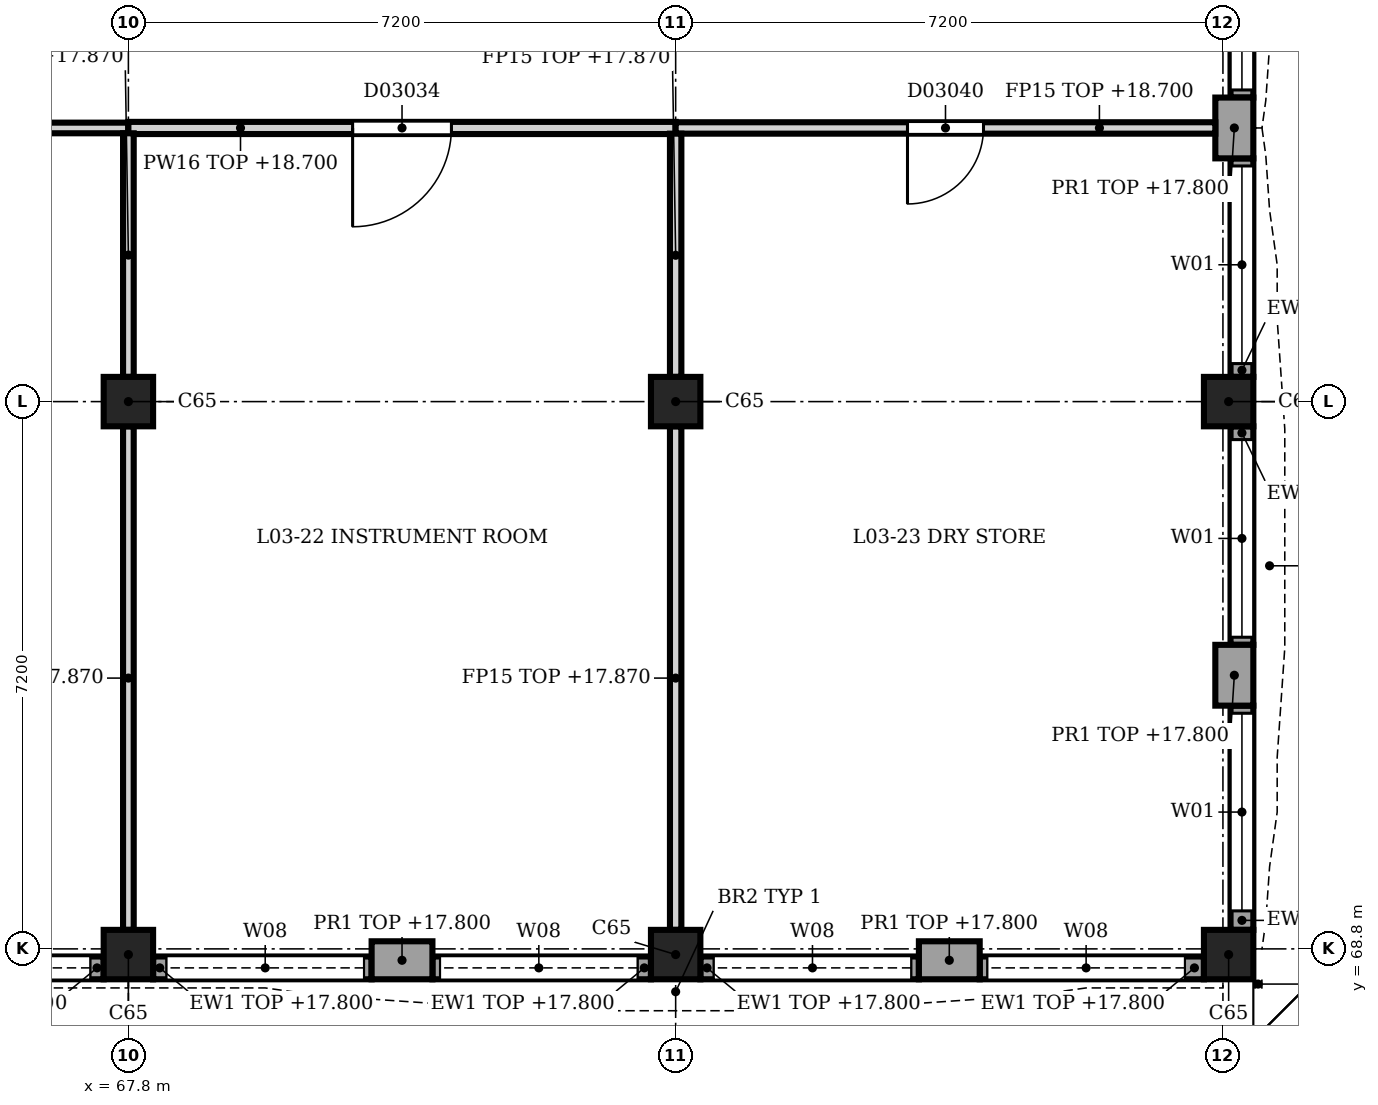
"""IFC4 building model, lengths in metres.
Left out: names, types, materials, properties, quantities, classifications, styles, units other than length and angle.
Written with IfcOpenShell. Run it as: python <this file> out.ifc"""

import sys

from ifc_helpers import new_model, si_unit, direction, frame, frame_2d, origin, origin_2d, place, context, subcontext, project, spatial, rectangle, extrude, element, fill, save


model = new_model("IFC4")
c1 = context("Model", 3, precision=1e-05, world=origin(), true_north=direction((0.0, 1.0)))
c2 = subcontext(c1, "Body", "Model", "MODEL_VIEW")
j1 = project(units=[si_unit("LENGTHUNIT", "METRE"), si_unit("PLANEANGLEUNIT", "RADIAN")], contexts=[c1])
p1 = place(None, origin())
s1 = spatial("IfcSite", under=j1, at=p1, CompositionType="ELEMENT")
p2 = place(p1, origin())
s2 = spatial("IfcBuilding", under=s1, at=p2, CompositionType="ELEMENT")
p3 = place(p2, frame((0.0, 0.0, 14.4)))
s3 = spatial("IfcBuildingStorey", under=s2, at=p3, CompositionType="ELEMENT", Elevation=14.4)
for number, where, z_axis, x_axis in (
    (1, (67.8, 68.725, 0.0), (0.0, 0.0, 1.0), (1.0, 0.0, 0.0)),
    (2, (67.8, 76.0, 0.0), (0.0, 0.0, 1.0), (1.0, 0.0, 0.0)),
    (3, (75.0, 68.725, 0.0), (0.0, 0.0, 1.0), (1.0, 0.0, 0.0)),
    (4, (75.0, 76.0, 0.0), (0.0, 0.0, 1.0), (1.0, 0.0, 0.0)),
    (5, (82.275, 68.725, 0.0), (0.0, 0.0, 1.0), (1.0, 0.0, 0.0)),
    (6, (82.275, 76.0, 0.0), (0.0, 0.0, 1.0), (1.0, 0.0, 0.0)),
):
    element("IfcColumn", number, at=place(p3, frame(where, z_axis=z_axis, x_axis=x_axis)), inside=s3, PredefinedType="COLUMN", context=c2, shape_type="SweptSolid", body=[
        extrude(rectangle(XDim=0.65, YDim=0.65, at=origin_2d()), origin(), (0.0, 0.0, 1.0), 4.5),
    ])
for number, where, z_axis, x_axis in (
    (7, (82.35, 80.0, 0.0), (0.0, 0.0, 1.0), (0.0, -1.0, 0.0)),
    (8, (82.35, 72.8, 0.0), (0.0, 0.0, 1.0), (0.0, -1.0, 0.0)),
):
    element("IfcWall", number, at=place(p3, frame(where, z_axis=z_axis, x_axis=x_axis)), inside=s3, PredefinedType="SOLIDWALL", context=c2, shape_type="SweptSolid", body=[
        extrude(rectangle(XDim=0.8, YDim=0.5, at=frame_2d((0.4, 0.0))), origin(), (0.0, 0.0, 1.0), 3.4),
    ])
p4 = place(p3, frame((82.45, 82.875, 0.0), z_axis=(0.0, 0.0, 1.0), x_axis=(0.0, -1.0, 0.0)))
e9 = element("IfcWall", 9, at=p4, inside=s3, PredefinedType="SOLIDWALL", context=c2, shape_type="SweptSolid", body=[
    extrude(rectangle(XDim=2.875, YDim=0.3, at=frame_2d((1.438, 0.0))), origin(), (0.0, 0.0, 1.0), 3.4),
])
p5 = place(p4, frame((0.175, 0.0, 0.9)))
e10 = element("IfcOpeningElement", 10, at=p5, cuts=e9, PredefinedType="OPENING", context=c2, shape_type="SweptSolid", body=[
    extrude(rectangle(XDim=2.6, YDim=2.4, at=frame_2d((1.3, 1.2))), frame((0.0, 0.16, 0.0), z_axis=(0.0, -1.0, 0.0), x_axis=(1.0, 0.0, 0.0)), (0.0, 0.0, 1.0), 0.32),
])
p6 = place(p3, frame((82.45, 79.2, 0.0), z_axis=(0.0, 0.0, 1.0), x_axis=(0.0, -1.0, 0.0)))
e11 = element("IfcWall", 11, at=p6, inside=s3, PredefinedType="SOLIDWALL", context=c2, shape_type="SweptSolid", body=[
    extrude(rectangle(XDim=2.875, YDim=0.3, at=frame_2d((1.438, 0.0))), origin(), (0.0, 0.0, 1.0), 3.4),
])
p7 = place(p6, frame((0.1, 0.0, 0.9)))
e12 = element("IfcOpeningElement", 12, at=p7, cuts=e11, PredefinedType="OPENING", context=c2, shape_type="SweptSolid", body=[
    extrude(rectangle(XDim=2.6, YDim=2.4, at=frame_2d((1.3, 1.2))), frame((0.0, 0.16, 0.0), z_axis=(0.0, -1.0, 0.0), x_axis=(1.0, 0.0, 0.0)), (0.0, 0.0, 1.0), 0.32),
])
p8 = place(p3, frame((82.45, 75.675, 0.0), z_axis=(0.0, 0.0, 1.0), x_axis=(0.0, -1.0, 0.0)))
e13 = element("IfcWall", 13, at=p8, inside=s3, PredefinedType="SOLIDWALL", context=c2, shape_type="SweptSolid", body=[
    extrude(rectangle(XDim=2.875, YDim=0.3, at=frame_2d((1.438, 0.0))), origin(), (0.0, 0.0, 1.0), 3.4),
])
p9 = place(p8, frame((0.175, 0.0, 0.9)))
e14 = element("IfcOpeningElement", 14, at=p9, cuts=e13, PredefinedType="OPENING", context=c2, shape_type="SweptSolid", body=[
    extrude(rectangle(XDim=2.6, YDim=2.4, at=frame_2d((1.3, 1.2))), frame((0.0, 0.16, 0.0), z_axis=(0.0, -1.0, 0.0), x_axis=(1.0, 0.0, 0.0)), (0.0, 0.0, 1.0), 0.32),
])
p10 = place(p3, frame((82.45, 72.0, 0.0), z_axis=(0.0, 0.0, 1.0), x_axis=(0.0, -1.0, 0.0)))
e15 = element("IfcWall", 15, at=p10, inside=s3, PredefinedType="SOLIDWALL", context=c2, shape_type="SweptSolid", body=[
    extrude(rectangle(XDim=2.95, YDim=0.3, at=frame_2d((1.475, 0.0))), origin(), (0.0, 0.0, 1.0), 3.4),
])
p11 = place(p10, frame((0.1, 0.0, 0.9)))
e16 = element("IfcOpeningElement", 16, at=p11, cuts=e15, PredefinedType="OPENING", context=c2, shape_type="SweptSolid", body=[
    extrude(rectangle(XDim=2.6, YDim=2.4, at=frame_2d((1.3, 1.2))), frame((0.0, 0.16, 0.0), z_axis=(0.0, -1.0, 0.0), x_axis=(1.0, 0.0, 0.0)), (0.0, 0.0, 1.0), 0.32),
])
for number, where, z_axis, x_axis in (
    (17, (79.0, 68.65, 0.0), (0.0, 0.0, 1.0), (-1.0, 0.0, 0.0)),
    (18, (71.8, 68.65, 0.0), (0.0, 0.0, 1.0), (-1.0, 0.0, 0.0)),
):
    element("IfcWall", number, at=place(p3, frame(where, z_axis=z_axis, x_axis=x_axis)), inside=s3, PredefinedType="SOLIDWALL", context=c2, shape_type="SweptSolid", body=[
        extrude(rectangle(XDim=0.8, YDim=0.5, at=frame_2d((0.4, 0.0))), origin(), (0.0, 0.0, 1.0), 3.4),
    ])
p12 = place(p3, frame((81.95, 68.55, 0.0), z_axis=(0.0, 0.0, 1.0), x_axis=(-1.0, 0.0, 0.0)))
e19 = element("IfcWall", 19, at=p12, inside=s3, PredefinedType="SOLIDWALL", context=c2, shape_type="SweptSolid", body=[
    extrude(rectangle(XDim=2.95, YDim=0.3, at=frame_2d((1.475, 0.0))), origin(), (0.0, 0.0, 1.0), 3.4),
])
p13 = place(p12, frame((0.25, 0.0, 1.2)))
e20 = element("IfcOpeningElement", 20, at=p13, cuts=e19, PredefinedType="OPENING", context=c2, shape_type="SweptSolid", body=[
    extrude(rectangle(XDim=2.6, YDim=2.1, at=frame_2d((1.3, 1.05))), frame((0.0, 0.16, 0.0), z_axis=(0.0, -1.0, 0.0), x_axis=(1.0, 0.0, 0.0)), (0.0, 0.0, 1.0), 0.32),
])
p14 = place(p3, frame((78.2, 68.55, 0.0), z_axis=(0.0, 0.0, 1.0), x_axis=(-1.0, 0.0, 0.0)))
e21 = element("IfcWall", 21, at=p14, inside=s3, PredefinedType="SOLIDWALL", context=c2, shape_type="SweptSolid", body=[
    extrude(rectangle(XDim=2.875, YDim=0.3, at=frame_2d((1.438, 0.0))), origin(), (0.0, 0.0, 1.0), 3.4),
])
p15 = place(p14, frame((0.1, 0.0, 1.2)))
e22 = element("IfcOpeningElement", 22, at=p15, cuts=e21, PredefinedType="OPENING", context=c2, shape_type="SweptSolid", body=[
    extrude(rectangle(XDim=2.6, YDim=2.1, at=frame_2d((1.3, 1.05))), frame((0.0, 0.16, 0.0), z_axis=(0.0, -1.0, 0.0), x_axis=(1.0, 0.0, 0.0)), (0.0, 0.0, 1.0), 0.32),
])
p16 = place(p3, frame((74.675, 68.55, 0.0), z_axis=(0.0, 0.0, 1.0), x_axis=(-1.0, 0.0, 0.0)))
e23 = element("IfcWall", 23, at=p16, inside=s3, PredefinedType="SOLIDWALL", context=c2, shape_type="SweptSolid", body=[
    extrude(rectangle(XDim=2.875, YDim=0.3, at=frame_2d((1.438, 0.0))), origin(), (0.0, 0.0, 1.0), 3.4),
])
p17 = place(p16, frame((0.175, 0.0, 1.2)))
e24 = element("IfcOpeningElement", 24, at=p17, cuts=e23, PredefinedType="OPENING", context=c2, shape_type="SweptSolid", body=[
    extrude(rectangle(XDim=2.6, YDim=2.1, at=frame_2d((1.3, 1.05))), frame((0.0, 0.16, 0.0), z_axis=(0.0, -1.0, 0.0), x_axis=(1.0, 0.0, 0.0)), (0.0, 0.0, 1.0), 0.32),
])
p18 = place(p3, frame((71.0, 68.55, 0.0), z_axis=(0.0, 0.0, 1.0), x_axis=(-1.0, 0.0, 0.0)))
e25 = element("IfcWall", 25, at=p18, inside=s3, PredefinedType="SOLIDWALL", context=c2, shape_type="SweptSolid", body=[
    extrude(rectangle(XDim=2.875, YDim=0.3, at=frame_2d((1.438, 0.0))), origin(), (0.0, 0.0, 1.0), 3.4),
])
p19 = place(p18, frame((0.1, 0.0, 1.2)))
e26 = element("IfcOpeningElement", 26, at=p19, cuts=e25, PredefinedType="OPENING", context=c2, shape_type="SweptSolid", body=[
    extrude(rectangle(XDim=2.6, YDim=2.1, at=frame_2d((1.3, 1.05))), frame((0.0, 0.16, 0.0), z_axis=(0.0, -1.0, 0.0), x_axis=(1.0, 0.0, 0.0)), (0.0, 0.0, 1.0), 0.32),
])
p20 = place(p3, frame((67.475, 68.55, 0.0), z_axis=(0.0, 0.0, 1.0), x_axis=(-1.0, 0.0, 0.0)))
e27 = element("IfcWall", 27, at=p20, inside=s3, PredefinedType="SOLIDWALL", context=c2, shape_type="SweptSolid", body=[
    extrude(rectangle(XDim=2.875, YDim=0.3, at=frame_2d((1.438, 0.0))), origin(), (0.0, 0.0, 1.0), 3.4),
])
p21 = place(p20, frame((0.175, 0.0, 1.2)))
e28 = element("IfcOpeningElement", 28, at=p21, cuts=e27, PredefinedType="OPENING", context=c2, shape_type="SweptSolid", body=[
    extrude(rectangle(XDim=2.6, YDim=2.1, at=frame_2d((1.3, 1.05))), frame((0.0, 0.16, 0.0), z_axis=(0.0, -1.0, 0.0), x_axis=(1.0, 0.0, 0.0)), (0.0, 0.0, 1.0), 0.32),
])
p22 = place(p3, frame((67.8, 79.6, 0.0), z_axis=(0.0, 0.0, 1.0), x_axis=(-1.0, 0.0, 0.0)))
e29 = element("IfcWall", 29, at=p22, inside=s3, PredefinedType="PARTITIONING", context=c2, shape_type="SweptSolid", body=[
    extrude(rectangle(XDim=10.8, YDim=0.14, at=frame_2d((5.4, 0.0))), origin(), (0.0, 0.0, 1.0), 4.3),
])
p23 = place(p22, frame((4.85, 0.0, 0.0)))
e30 = element("IfcOpeningElement", 30, at=p23, cuts=e29, PredefinedType="OPENING", context=c2, shape_type="SweptSolid", body=[
    extrude(rectangle(XDim=1.2, YDim=2.1, at=frame_2d((0.6, 1.05))), frame((0.0, 0.08, 0.0), z_axis=(0.0, -1.0, 0.0), x_axis=(1.0, 0.0, 0.0)), (0.0, 0.0, 1.0), 0.16),
])
p24 = place(p3, frame((75.0, 79.6, 0.0), z_axis=(0.0, 0.0, 1.0), x_axis=(-1.0, 0.0, 0.0)))
e31 = element("IfcWall", 31, at=p24, inside=s3, PredefinedType="PARTITIONING", context=c2, shape_type="SweptSolid", body=[
    extrude(rectangle(XDim=7.2, YDim=0.16, at=frame_2d((3.6, 0.0))), origin(), (0.0, 0.0, 1.0), 4.3),
])
p25 = place(p24, frame((2.95, 0.0, 0.0)))
e32 = element("IfcOpeningElement", 32, at=p25, cuts=e31, PredefinedType="OPENING", context=c2, shape_type="SweptSolid", body=[
    extrude(rectangle(XDim=1.3, YDim=2.2, at=frame_2d((0.65, 1.1))), frame((0.0, 0.09, 0.0), z_axis=(0.0, -1.0, 0.0), x_axis=(1.0, 0.0, 0.0)), (0.0, 0.0, 1.0), 0.18),
])
p26 = place(p3, frame((82.1, 79.6, 0.0), z_axis=(0.0, 0.0, 1.0), x_axis=(-1.0, 0.0, 0.0)))
e33 = element("IfcWall", 33, at=p26, inside=s3, PredefinedType="PARTITIONING", context=c2, shape_type="SweptSolid", body=[
    extrude(rectangle(XDim=7.1, YDim=0.15, at=frame_2d((3.55, 0.0))), origin(), (0.0, 0.0, 1.0), 4.3),
])
p27 = place(p26, frame((3.05, 0.0, 0.0)))
e34 = element("IfcOpeningElement", 34, at=p27, cuts=e33, PredefinedType="OPENING", context=c2, shape_type="SweptSolid", body=[
    extrude(rectangle(XDim=1.0, YDim=2.1, at=frame_2d((0.5, 1.05))), frame((0.0, 0.085, 0.0), z_axis=(0.0, -1.0, 0.0), x_axis=(1.0, 0.0, 0.0)), (0.0, 0.0, 1.0), 0.17),
])
p28 = place(p3, frame((67.8, 69.05, 0.0), z_axis=(0.0, 0.0, 1.0), x_axis=(0.0, 1.0, 0.0)))
e35 = element("IfcWall", 35, at=p28, inside=s3, PredefinedType="PARTITIONING", context=c2, shape_type="SweptSolid", body=[
    extrude(rectangle(XDim=6.625, YDim=0.14, at=frame_2d((3.312, 0.0))), origin(), (0.0, 0.0, 1.0), 3.47),
])
p29 = place(p3, frame((67.8, 76.325, 0.0), z_axis=(0.0, 0.0, 1.0), x_axis=(0.0, 1.0, 0.0)))
e36 = element("IfcWall", 36, at=p29, inside=s3, PredefinedType="PARTITIONING", context=c2, shape_type="SweptSolid", body=[
    extrude(rectangle(XDim=3.205, YDim=0.14, at=frame_2d((1.603, 0.0))), origin(), (0.0, 0.0, 1.0), 3.47),
])
p30 = place(p3, frame((75.0, 69.05, 0.0), z_axis=(0.0, 0.0, 1.0), x_axis=(0.0, 1.0, 0.0)))
e37 = element("IfcWall", 37, at=p30, inside=s3, PredefinedType="PARTITIONING", context=c2, shape_type="SweptSolid", body=[
    extrude(rectangle(XDim=6.625, YDim=0.15, at=frame_2d((3.312, 0.0))), origin(), (0.0, 0.0, 1.0), 3.47),
])
p31 = place(p3, frame((75.0, 76.325, 0.0), z_axis=(0.0, 0.0, 1.0), x_axis=(0.0, 1.0, 0.0)))
e38 = element("IfcWall", 38, at=p31, inside=s3, PredefinedType="PARTITIONING", context=c2, shape_type="SweptSolid", body=[
    extrude(rectangle(XDim=3.2, YDim=0.15, at=frame_2d((1.6, 0.0))), origin(), (0.0, 0.0, 1.0), 3.47),
])
p32 = place(p5, origin())
e39 = element("IfcWindow", 39, at=p32, inside=s3, PartitioningType="SINGLE_PANEL", PredefinedType="WINDOW", context=c2, shape_type="SweptSolid", body=[
    extrude(rectangle(XDim=2.6, YDim=2.4, at=frame_2d((1.3, 1.2))), frame((0.0, 0.03, 0.0), z_axis=(0.0, -1.0, 0.0), x_axis=(1.0, 0.0, 0.0)), (0.0, 0.0, 1.0), 0.06),
])
fill(e10, e39)
p33 = place(p7, origin())
e40 = element("IfcWindow", 40, at=p33, inside=s3, PartitioningType="SINGLE_PANEL", PredefinedType="WINDOW", context=c2, shape_type="SweptSolid", body=[
    extrude(rectangle(XDim=2.6, YDim=2.4, at=frame_2d((1.3, 1.2))), frame((0.0, 0.03, 0.0), z_axis=(0.0, -1.0, 0.0), x_axis=(1.0, 0.0, 0.0)), (0.0, 0.0, 1.0), 0.06),
])
fill(e12, e40)
p34 = place(p9, origin())
e41 = element("IfcWindow", 41, at=p34, inside=s3, PartitioningType="SINGLE_PANEL", PredefinedType="WINDOW", context=c2, shape_type="SweptSolid", body=[
    extrude(rectangle(XDim=2.6, YDim=2.4, at=frame_2d((1.3, 1.2))), frame((0.0, 0.03, 0.0), z_axis=(0.0, -1.0, 0.0), x_axis=(1.0, 0.0, 0.0)), (0.0, 0.0, 1.0), 0.06),
])
fill(e14, e41)
p35 = place(p11, origin())
e42 = element("IfcWindow", 42, at=p35, inside=s3, PartitioningType="SINGLE_PANEL", PredefinedType="WINDOW", context=c2, shape_type="SweptSolid", body=[
    extrude(rectangle(XDim=2.6, YDim=2.4, at=frame_2d((1.3, 1.2))), frame((0.0, 0.03, 0.0), z_axis=(0.0, -1.0, 0.0), x_axis=(1.0, 0.0, 0.0)), (0.0, 0.0, 1.0), 0.06),
])
fill(e16, e42)
p36 = place(p13, origin())
e43 = element("IfcWindow", 43, at=p36, inside=s3, PartitioningType="SINGLE_PANEL", PredefinedType="WINDOW", context=c2, shape_type="SweptSolid", body=[
    extrude(rectangle(XDim=2.6, YDim=2.1, at=frame_2d((1.3, 1.05))), frame((0.0, 0.03, 0.0), z_axis=(0.0, -1.0, 0.0), x_axis=(1.0, 0.0, 0.0)), (0.0, 0.0, 1.0), 0.06),
])
fill(e20, e43)
p37 = place(p15, origin())
e44 = element("IfcWindow", 44, at=p37, inside=s3, PartitioningType="SINGLE_PANEL", PredefinedType="WINDOW", context=c2, shape_type="SweptSolid", body=[
    extrude(rectangle(XDim=2.6, YDim=2.1, at=frame_2d((1.3, 1.05))), frame((0.0, 0.03, 0.0), z_axis=(0.0, -1.0, 0.0), x_axis=(1.0, 0.0, 0.0)), (0.0, 0.0, 1.0), 0.06),
])
fill(e22, e44)
p38 = place(p17, origin())
e45 = element("IfcWindow", 45, at=p38, inside=s3, PartitioningType="SINGLE_PANEL", PredefinedType="WINDOW", context=c2, shape_type="SweptSolid", body=[
    extrude(rectangle(XDim=2.6, YDim=2.1, at=frame_2d((1.3, 1.05))), frame((0.0, 0.03, 0.0), z_axis=(0.0, -1.0, 0.0), x_axis=(1.0, 0.0, 0.0)), (0.0, 0.0, 1.0), 0.06),
])
fill(e24, e45)
p39 = place(p19, origin())
e46 = element("IfcWindow", 46, at=p39, inside=s3, PartitioningType="SINGLE_PANEL", PredefinedType="WINDOW", context=c2, shape_type="SweptSolid", body=[
    extrude(rectangle(XDim=2.6, YDim=2.1, at=frame_2d((1.3, 1.05))), frame((0.0, 0.03, 0.0), z_axis=(0.0, -1.0, 0.0), x_axis=(1.0, 0.0, 0.0)), (0.0, 0.0, 1.0), 0.06),
])
fill(e26, e46)
p40 = place(p21, origin())
e47 = element("IfcWindow", 47, at=p40, inside=s3, PartitioningType="SINGLE_PANEL", PredefinedType="WINDOW", context=c2, shape_type="SweptSolid", body=[
    extrude(rectangle(XDim=2.6, YDim=2.1, at=frame_2d((1.3, 1.05))), frame((0.0, 0.03, 0.0), z_axis=(0.0, -1.0, 0.0), x_axis=(1.0, 0.0, 0.0)), (0.0, 0.0, 1.0), 0.06),
])
fill(e28, e47)
p41 = place(p25, origin())
e48 = element("IfcDoor", 48, at=p41, inside=s3, OperationType="SINGLE_SWING_LEFT", PredefinedType="DOOR", context=c2, shape_type="SweptSolid", body=[
    extrude(rectangle(XDim=1.3, YDim=2.2, at=frame_2d((0.65, 1.1))), frame((0.0, 0.025, 0.0), z_axis=(0.0, -1.0, 0.0), x_axis=(1.0, 0.0, 0.0)), (0.0, 0.0, 1.0), 0.05),
])
fill(e32, e48)
p42 = place(p27, origin())
e49 = element("IfcDoor", 49, at=p42, inside=s3, OperationType="SINGLE_SWING_RIGHT", PredefinedType="DOOR", context=c2, shape_type="SweptSolid", body=[
    extrude(rectangle(XDim=1.0, YDim=2.1, at=frame_2d((0.5, 1.05))), frame((0.0, 0.025, 0.0), z_axis=(0.0, -1.0, 0.0), x_axis=(1.0, 0.0, 0.0)), (0.0, 0.0, 1.0), 0.05),
])
fill(e34, e49)
save(model, sys.argv[1])
